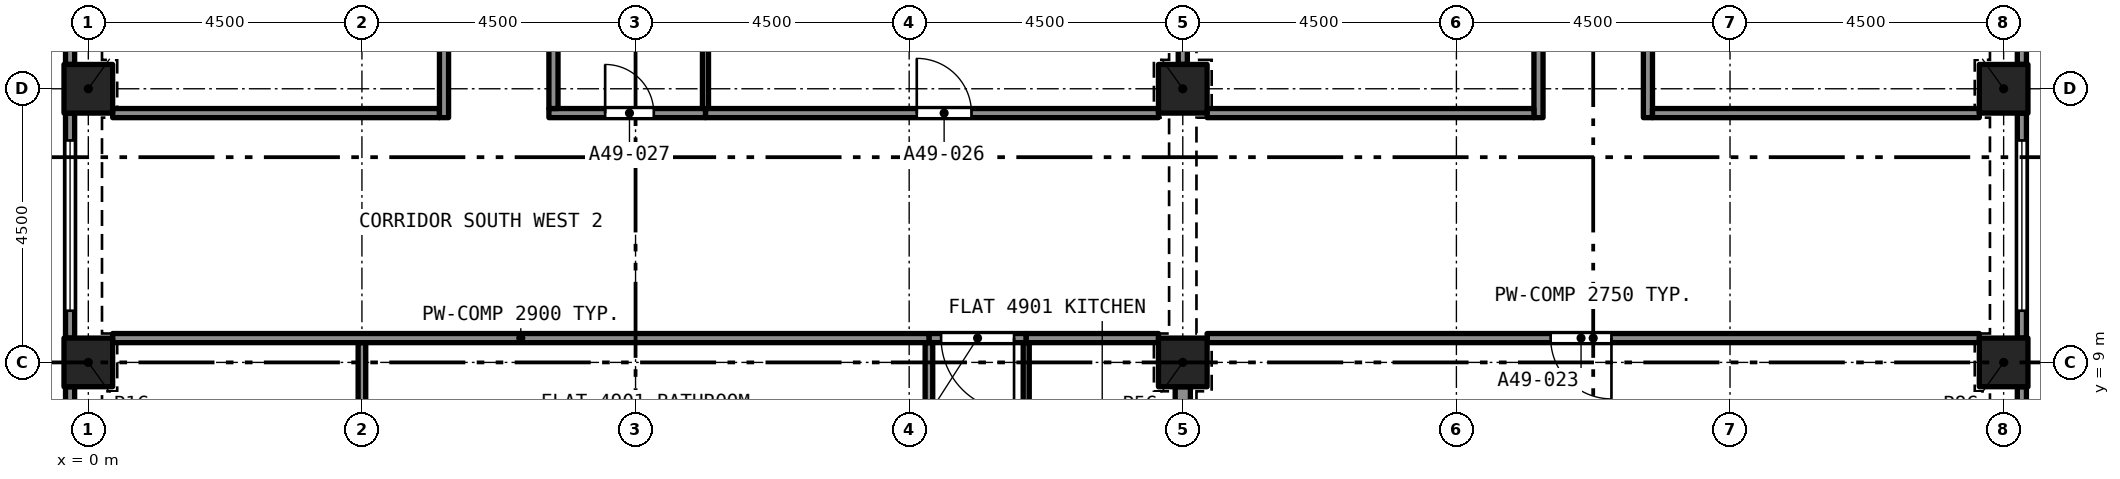
"""IFC4 building model, lengths in metres.
Left out: names, types, materials, properties, quantities, classifications, styles, units other than length and angle.
Written with IfcOpenShell. Run it as: python <this file> out.ifc"""

import sys

from ifc_helpers import new_model, si_unit, direction, frame, frame_2d, origin, origin_2d, place, context, subcontext, project, spatial, rectangle, extrude, element, fill, save


model = new_model("IFC4")
c1 = context("Model", 3, precision=1e-05, world=origin(), true_north=direction((0.0, 1.0)))
c2 = subcontext(c1, "Body", "Model", "MODEL_VIEW")
j1 = project(units=[si_unit("LENGTHUNIT", "METRE"), si_unit("PLANEANGLEUNIT", "RADIAN")], contexts=[c1])
p1 = place(None, origin())
s1 = spatial("IfcSite", under=j1, at=p1, CompositionType="ELEMENT")
p2 = place(p1, origin())
s2 = spatial("IfcBuilding", under=s1, at=p2, CompositionType="ELEMENT")
p3 = place(p2, frame((0.0, 0.0, 179.5)))
s3 = spatial("IfcBuildingStorey", under=s2, at=p3, CompositionType="ELEMENT", Elevation=179.5)
for number, where, z_axis, x_axis in (
    (1, (0.0, 9.0, 0.0), (0.0, 0.0, 1.0), (1.0, 0.0, 0.0)),
    (2, (18.0, 9.0, 0.0), (0.0, 0.0, 1.0), (1.0, 0.0, 0.0)),
    (3, (31.5, 9.0, 0.0), (0.0, 0.0, 1.0), (1.0, 0.0, 0.0)),
    (4, (0.0, 13.5, 0.0), (0.0, 0.0, 1.0), (1.0, 0.0, 0.0)),
    (5, (18.0, 13.5, 0.0), (0.0, 0.0, 1.0), (1.0, 0.0, 0.0)),
    (6, (31.5, 13.5, 0.0), (0.0, 0.0, 1.0), (1.0, 0.0, 0.0)),
):
    element("IfcColumn", number, at=place(p3, frame(where, z_axis=z_axis, x_axis=x_axis)), inside=s3, PredefinedType="COLUMN", context=c2, shape_type="SweptSolid", body=[
        extrude(rectangle(XDim=0.8, YDim=0.8, at=origin_2d()), origin(), (0.0, 0.0, 1.0), 3.2),
    ])
p4 = place(p3, frame((31.8, 8.6, 0.0), z_axis=(0.0, 0.0, 1.0), x_axis=(0.0, -1.0, 0.0)))
e7 = element("IfcWall", 7, at=p4, inside=s3, PredefinedType="SOLIDWALL", context=c2, shape_type="SweptSolid", body=[
    extrude(rectangle(XDim=3.7, YDim=0.15, at=frame_2d((1.85, 0.0))), origin(), (0.0, 0.0, 1.0), 3.2),
])
p5 = place(p4, frame((0.45, 0.0, 0.45)))
e8 = element("IfcOpeningElement", 8, at=p5, cuts=e7, PredefinedType="OPENING", context=c2, shape_type="SweptSolid", body=[
    extrude(rectangle(XDim=2.8, YDim=1.95, at=frame_2d((1.4, 0.975))), frame((0.0, 0.085, 0.0), z_axis=(0.0, -1.0, 0.0), x_axis=(1.0, 0.0, 0.0)), (0.0, 0.0, 1.0), 0.17),
])
p6 = place(p3, frame((31.8, 13.1, 0.0), z_axis=(0.0, 0.0, 1.0), x_axis=(0.0, -1.0, 0.0)))
e9 = element("IfcWall", 9, at=p6, inside=s3, PredefinedType="SOLIDWALL", context=c2, shape_type="SweptSolid", body=[
    extrude(rectangle(XDim=3.7, YDim=0.15, at=frame_2d((1.85, 0.0))), origin(), (0.0, 0.0, 1.0), 3.2),
])
p7 = place(p6, frame((0.45, 0.0, 0.45)))
e10 = element("IfcOpeningElement", 10, at=p7, cuts=e9, PredefinedType="OPENING", context=c2, shape_type="SweptSolid", body=[
    extrude(rectangle(XDim=2.8, YDim=1.95, at=frame_2d((1.4, 0.975))), frame((0.0, 0.085, 0.0), z_axis=(0.0, -1.0, 0.0), x_axis=(1.0, 0.0, 0.0)), (0.0, 0.0, 1.0), 0.17),
])
p8 = place(p3, frame((31.8, 17.6, 0.0), z_axis=(0.0, 0.0, 1.0), x_axis=(0.0, -1.0, 0.0)))
e11 = element("IfcWall", 11, at=p8, inside=s3, PredefinedType="SOLIDWALL", context=c2, shape_type="SweptSolid", body=[
    extrude(rectangle(XDim=3.7, YDim=0.15, at=frame_2d((1.85, 0.0))), origin(), (0.0, 0.0, 1.0), 3.2),
])
p9 = place(p8, frame((0.45, 0.0, 0.45)))
e12 = element("IfcOpeningElement", 12, at=p9, cuts=e11, PredefinedType="OPENING", context=c2, shape_type="SweptSolid", body=[
    extrude(rectangle(XDim=2.8, YDim=1.95, at=frame_2d((1.4, 0.975))), frame((0.0, 0.085, 0.0), z_axis=(0.0, -1.0, 0.0), x_axis=(1.0, 0.0, 0.0)), (0.0, 0.0, 1.0), 0.17),
])
p10 = place(p3, frame((-0.3, 13.9, 0.0), z_axis=(0.0, 0.0, 1.0), x_axis=(0.0, 1.0, 0.0)))
e13 = element("IfcWall", 13, at=p10, inside=s3, PredefinedType="SOLIDWALL", context=c2, shape_type="SweptSolid", body=[
    extrude(rectangle(XDim=3.7, YDim=0.15, at=frame_2d((1.85, 0.0))), origin(), (0.0, 0.0, 1.0), 3.2),
])
p11 = place(p10, frame((0.45, 0.0, 0.45)))
e14 = element("IfcOpeningElement", 14, at=p11, cuts=e13, PredefinedType="OPENING", context=c2, shape_type="SweptSolid", body=[
    extrude(rectangle(XDim=2.8, YDim=1.95, at=frame_2d((1.4, 0.975))), frame((0.0, 0.085, 0.0), z_axis=(0.0, -1.0, 0.0), x_axis=(1.0, 0.0, 0.0)), (0.0, 0.0, 1.0), 0.17),
])
p12 = place(p3, frame((-0.3, 9.4, 0.0), z_axis=(0.0, 0.0, 1.0), x_axis=(0.0, 1.0, 0.0)))
e15 = element("IfcWall", 15, at=p12, inside=s3, PredefinedType="SOLIDWALL", context=c2, shape_type="SweptSolid", body=[
    extrude(rectangle(XDim=3.7, YDim=0.15, at=frame_2d((1.85, 0.0))), origin(), (0.0, 0.0, 1.0), 3.2),
])
p13 = place(p12, frame((0.45, 0.0, 0.45)))
e16 = element("IfcOpeningElement", 16, at=p13, cuts=e15, PredefinedType="OPENING", context=c2, shape_type="SweptSolid", body=[
    extrude(rectangle(XDim=2.8, YDim=1.95, at=frame_2d((1.4, 0.975))), frame((0.0, 0.085, 0.0), z_axis=(0.0, -1.0, 0.0), x_axis=(1.0, 0.0, 0.0)), (0.0, 0.0, 1.0), 0.17),
])
p14 = place(p3, frame((-0.3, 4.9, 0.0), z_axis=(0.0, 0.0, 1.0), x_axis=(0.0, 1.0, 0.0)))
e17 = element("IfcWall", 17, at=p14, inside=s3, PredefinedType="SOLIDWALL", context=c2, shape_type="SweptSolid", body=[
    extrude(rectangle(XDim=3.7, YDim=0.15, at=frame_2d((1.85, 0.0))), origin(), (0.0, 0.0, 1.0), 3.2),
])
p15 = place(p14, frame((0.45, 0.0, 0.45)))
e18 = element("IfcOpeningElement", 18, at=p15, cuts=e17, PredefinedType="OPENING", context=c2, shape_type="SweptSolid", body=[
    extrude(rectangle(XDim=2.8, YDim=1.95, at=frame_2d((1.4, 0.975))), frame((0.0, 0.085, 0.0), z_axis=(0.0, -1.0, 0.0), x_axis=(1.0, 0.0, 0.0)), (0.0, 0.0, 1.0), 0.17),
])
p16 = place(p3, frame((13.825, 7.333, 0.0), z_axis=(0.0, 0.0, 1.0), x_axis=(0.0, 1.0, 0.0)))
e19 = element("IfcWall", 19, at=p16, inside=s3, PredefinedType="PARTITIONING", context=c2, shape_type="SweptSolid", body=[
    extrude(rectangle(XDim=1.992, YDim=0.125, at=frame_2d((0.996, 0.0))), origin(), (0.0, 0.0, 1.0), 2.9),
])
p17 = place(p3, frame((4.5, 7.27, 0.0), z_axis=(0.0, 0.0, 1.0), x_axis=(0.0, 1.0, 0.0)))
e20 = element("IfcWall", 20, at=p17, inside=s3, PredefinedType="PARTITIONING", context=c2, shape_type="SweptSolid", body=[
    extrude(rectangle(XDim=2.055, YDim=0.125, at=frame_2d((1.027, 0.0))), origin(), (0.0, 0.0, 1.0), 2.9),
])
p18 = place(p3, frame((18.0, 4.9, 0.0), z_axis=(0.0, 0.0, 1.0), x_axis=(0.0, 1.0, 0.0)))
e21 = element("IfcWall", 21, at=p18, inside=s3, PredefinedType="PARTITIONING", context=c2, shape_type="SweptSolid", body=[
    extrude(rectangle(XDim=3.7, YDim=0.25, at=frame_2d((1.85, 0.0))), origin(), (0.0, 0.0, 1.0), 2.38),
])
p19 = place(p3, frame((15.425, 7.32, 0.0), z_axis=(0.0, 0.0, 1.0), x_axis=(0.0, 1.0, 0.0)))
e22 = element("IfcWall", 22, at=p19, inside=s3, PredefinedType="PARTITIONING", context=c2, shape_type="SweptSolid", body=[
    extrude(rectangle(XDim=2.005, YDim=0.1, at=frame_2d((1.002, 0.0))), origin(), (0.0, 0.0, 1.0), 2.9),
])
p20 = place(p3, frame((15.425, 9.4, 0.0), z_axis=(0.0, 0.0, 1.0), x_axis=(-1.0, 0.0, 0.0)))
e23 = element("IfcWall", 23, at=p20, inside=s3, PredefinedType="PARTITIONING", context=c2, shape_type="SweptSolid", body=[
    extrude(rectangle(XDim=1.6, YDim=0.15, at=frame_2d((0.8, 0.0))), origin(), (0.0, 0.0, 1.0), 2.9),
])
p21 = place(p20, frame((0.2, 0.0, 0.0)))
e24 = element("IfcOpeningElement", 24, at=p21, cuts=e23, PredefinedType="OPENING", context=c2, shape_type="SweptSolid", body=[
    extrude(rectangle(XDim=1.2, YDim=2.4, at=frame_2d((0.6, 1.2))), frame((0.0, 0.085, 0.0), z_axis=(0.0, -1.0, 0.0), x_axis=(1.0, 0.0, 0.0)), (0.0, 0.0, 1.0), 0.17),
])
p22 = place(p3, frame((15.425, 9.4, 0.0), z_axis=(0.0, 0.0, 1.0), x_axis=(1.0, 0.0, 0.0)))
e25 = element("IfcWall", 25, at=p22, inside=s3, PredefinedType="PARTITIONING", context=c2, shape_type="SweptSolid", body=[
    extrude(rectangle(XDim=2.175, YDim=0.15, at=frame_2d((1.087, 0.0))), origin(), (0.0, 0.0, 1.0), 2.9),
])
p23 = place(p3, frame((0.4, 9.4, 0.0), z_axis=(0.0, 0.0, 1.0), x_axis=(1.0, 0.0, 0.0)))
e26 = element("IfcWall", 26, at=p23, inside=s3, PredefinedType="PARTITIONING", context=c2, shape_type="SweptSolid", body=[
    extrude(rectangle(XDim=13.425, YDim=0.15, at=frame_2d((6.712, 0.0))), origin(), (0.0, 0.0, 1.0), 2.9),
])
p24 = place(p3, frame((31.1, 9.4, 0.0), z_axis=(0.0, 0.0, 1.0), x_axis=(-1.0, 0.0, 0.0)))
e27 = element("IfcWall", 27, at=p24, inside=s3, PredefinedType="PARTITIONING", context=c2, shape_type="SweptSolid", body=[
    extrude(rectangle(XDim=12.7, YDim=0.15, at=frame_2d((6.35, 0.0))), origin(), (0.0, 0.0, 1.0), 2.75),
])
p25 = place(p24, frame((6.05, 0.0, 0.0)))
e28 = element("IfcOpeningElement", 28, at=p25, cuts=e27, PredefinedType="OPENING", context=c2, shape_type="SweptSolid", body=[
    extrude(rectangle(XDim=1.0, YDim=2.1, at=frame_2d((0.5, 1.05))), frame((0.0, 0.085, 0.0), z_axis=(0.0, -1.0, 0.0), x_axis=(1.0, 0.0, 0.0)), (0.0, 0.0, 1.0), 0.17),
])
p26 = place(p3, frame((23.85, 13.025, 0.0), z_axis=(0.0, 0.0, 1.0), x_axis=(0.0, 1.0, 0.0)))
e29 = element("IfcWall", 29, at=p26, inside=s3, PredefinedType="PARTITIONING", context=c2, shape_type="SweptSolid", body=[
    extrude(rectangle(XDim=9.55, YDim=0.15, at=frame_2d((4.775, 0.0))), origin(), (0.0, 0.0, 1.0), 2.75),
])
p27 = place(p26, frame((4.275, 0.0, 0.0)))
e30 = element("IfcOpeningElement", 30, at=p27, cuts=e29, PredefinedType="OPENING", context=c2, shape_type="SweptSolid", body=[
    extrude(rectangle(XDim=1.0, YDim=2.1, at=frame_2d((0.5, 1.05))), frame((0.0, 0.085, 0.0), z_axis=(0.0, -1.0, 0.0), x_axis=(1.0, 0.0, 0.0)), (0.0, 0.0, 1.0), 0.17),
])
p28 = place(p3, frame((25.65, 22.575, 0.0), z_axis=(0.0, 0.0, 1.0), x_axis=(0.0, -1.0, 0.0)))
e31 = element("IfcWall", 31, at=p28, inside=s3, PredefinedType="PARTITIONING", context=c2, shape_type="SweptSolid", body=[
    extrude(rectangle(XDim=9.55, YDim=0.15, at=frame_2d((4.775, 0.0))), origin(), (0.0, 0.0, 1.0), 2.75),
])
p29 = place(p28, frame((4.275, 0.0, 0.0)))
e32 = element("IfcOpeningElement", 32, at=p29, cuts=e31, PredefinedType="OPENING", context=c2, shape_type="SweptSolid", body=[
    extrude(rectangle(XDim=1.0, YDim=2.1, at=frame_2d((0.5, 1.05))), frame((0.0, 0.085, 0.0), z_axis=(0.0, -1.0, 0.0), x_axis=(1.0, 0.0, 0.0)), (0.0, 0.0, 1.0), 0.17),
])
for number, where, z_axis, x_axis in (
    (33, (18.4, 13.1, 0.0), (0.0, 0.0, 1.0), (1.0, 0.0, 0.0)),
    (34, (25.725, 13.1, 0.0), (0.0, 0.0, 1.0), (1.0, 0.0, 0.0)),
):
    element("IfcWall", number, at=place(p3, frame(where, z_axis=z_axis, x_axis=x_axis)), inside=s3, PredefinedType="PARTITIONING", context=c2, shape_type="SweptSolid", body=[
        extrude(rectangle(XDim=5.375, YDim=0.15, at=frame_2d((2.688, 0.0))), origin(), (0.0, 0.0, 1.0), 2.75),
    ])
p30 = place(p3, frame((10.15, 13.1, 0.0), z_axis=(0.0, 0.0, 1.0), x_axis=(1.0, 0.0, 0.0)))
e35 = element("IfcWall", 35, at=p30, inside=s3, PredefinedType="PARTITIONING", context=c2, shape_type="SweptSolid", body=[
    extrude(rectangle(XDim=7.45, YDim=0.15, at=frame_2d((3.725, 0.0))), origin(), (0.0, 0.0, 1.0), 2.9),
])
p31 = place(p30, frame((3.475, 0.0, 0.0)))
e36 = element("IfcOpeningElement", 36, at=p31, cuts=e35, PredefinedType="OPENING", context=c2, shape_type="SweptSolid", body=[
    extrude(rectangle(XDim=0.9, YDim=2.1, at=frame_2d((0.45, 1.05))), frame((0.0, 0.085, 0.0), z_axis=(0.0, -1.0, 0.0), x_axis=(1.0, 0.0, 0.0)), (0.0, 0.0, 1.0), 0.17),
])
p32 = place(p3, frame((7.575, 13.1, 0.0), z_axis=(0.0, 0.0, 1.0), x_axis=(1.0, 0.0, 0.0)))
e37 = element("IfcWall", 37, at=p32, inside=s3, PredefinedType="PARTITIONING", context=c2, shape_type="SweptSolid", body=[
    extrude(rectangle(XDim=2.575, YDim=0.15, at=frame_2d((1.288, 0.0))), origin(), (0.0, 0.0, 1.0), 2.9),
])
p33 = place(p32, frame((0.925, 0.0, 0.0)))
e38 = element("IfcOpeningElement", 38, at=p33, cuts=e37, PredefinedType="OPENING", context=c2, shape_type="SweptSolid", body=[
    extrude(rectangle(XDim=0.8, YDim=2.1, at=frame_2d((0.4, 1.05))), frame((0.0, 0.085, 0.0), z_axis=(0.0, -1.0, 0.0), x_axis=(1.0, 0.0, 0.0)), (0.0, 0.0, 1.0), 0.17),
])
p34 = place(p3, frame((0.4, 13.1, 0.0), z_axis=(0.0, 0.0, 1.0), x_axis=(1.0, 0.0, 0.0)))
e39 = element("IfcWall", 39, at=p34, inside=s3, PredefinedType="PARTITIONING", context=c2, shape_type="SweptSolid", body=[
    extrude(rectangle(XDim=5.375, YDim=0.15, at=frame_2d((2.688, 0.0))), origin(), (0.0, 0.0, 1.0), 2.9),
])
p35 = place(p3, frame((18.0, 13.9, 0.0), z_axis=(0.0, 0.0, 1.0), x_axis=(0.0, 1.0, 0.0)))
e40 = element("IfcWall", 40, at=p35, inside=s3, PredefinedType="PARTITIONING", context=c2, shape_type="SweptSolid", body=[
    extrude(rectangle(XDim=3.4, YDim=0.15, at=frame_2d((1.7, 0.0))), origin(), (0.0, 0.0, 1.0), 2.38),
])
p36 = place(p3, frame((7.65, 13.175, 0.0), z_axis=(0.0, 0.0, 1.0), x_axis=(0.0, 1.0, 0.0)))
e41 = element("IfcWall", 41, at=p36, inside=s3, PredefinedType="PARTITIONING", context=c2, shape_type="SweptSolid", body=[
    extrude(rectangle(XDim=4.125, YDim=0.15, at=frame_2d((2.062, 0.0))), origin(), (0.0, 0.0, 1.0), 2.9),
])
p37 = place(p3, frame((5.85, 13.025, 0.0), z_axis=(0.0, 0.0, 1.0), x_axis=(0.0, 1.0, 0.0)))
e42 = element("IfcWall", 42, at=p37, inside=s3, PredefinedType="PARTITIONING", context=c2, shape_type="SweptSolid", body=[
    extrude(rectangle(XDim=9.475, YDim=0.15, at=frame_2d((4.738, 0.0))), origin(), (0.0, 0.0, 1.0), 2.9),
])
p38 = place(p37, frame((4.275, 0.0, 0.0)))
e43 = element("IfcOpeningElement", 43, at=p38, cuts=e42, PredefinedType="OPENING", context=c2, shape_type="SweptSolid", body=[
    extrude(rectangle(XDim=1.0, YDim=2.1, at=frame_2d((0.5, 1.05))), frame((0.0, 0.085, 0.0), z_axis=(0.0, -1.0, 0.0), x_axis=(1.0, 0.0, 0.0)), (0.0, 0.0, 1.0), 0.17),
])
p39 = place(p3, frame((10.15, 13.175, 0.0), z_axis=(0.0, 0.0, 1.0), x_axis=(0.0, 1.0, 0.0)))
e44 = element("IfcWall", 44, at=p39, inside=s3, PredefinedType="PARTITIONING", context=c2, shape_type="SweptSolid", body=[
    extrude(rectangle(XDim=4.05, YDim=0.1, at=frame_2d((2.025, 0.0))), origin(), (0.0, 0.0, 1.0), 2.9),
])
p40 = place(p7, origin())
e45 = element("IfcWindow", 45, at=p40, inside=s3, PartitioningType="SINGLE_PANEL", PredefinedType="WINDOW", context=c2, shape_type="SweptSolid", body=[
    extrude(rectangle(XDim=2.8, YDim=1.95, at=frame_2d((1.4, 0.975))), frame((0.0, 0.03, 0.0), z_axis=(0.0, -1.0, 0.0), x_axis=(1.0, 0.0, 0.0)), (0.0, 0.0, 1.0), 0.06),
])
fill(e10, e45)
p41 = place(p13, origin())
e46 = element("IfcWindow", 46, at=p41, inside=s3, PartitioningType="SINGLE_PANEL", PredefinedType="WINDOW", context=c2, shape_type="SweptSolid", body=[
    extrude(rectangle(XDim=2.8, YDim=1.95, at=frame_2d((1.4, 0.975))), frame((0.0, 0.03, 0.0), z_axis=(0.0, -1.0, 0.0), x_axis=(1.0, 0.0, 0.0)), (0.0, 0.0, 1.0), 0.06),
])
fill(e16, e46)
p42 = place(p21, origin())
e47 = element("IfcDoor", 47, at=p42, inside=s3, OperationType="SINGLE_SWING_LEFT", PredefinedType="DOOR", context=c2, shape_type="SweptSolid", body=[
    extrude(rectangle(XDim=1.2, YDim=2.4, at=frame_2d((0.6, 1.2))), frame((0.0, 0.025, 0.0), z_axis=(0.0, -1.0, 0.0), x_axis=(1.0, 0.0, 0.0)), (0.0, 0.0, 1.0), 0.05),
])
fill(e24, e47)
p43 = place(p25, origin())
e48 = element("IfcDoor", 48, at=p43, inside=s3, OperationType="SINGLE_SWING_RIGHT", PredefinedType="DOOR", context=c2, shape_type="SweptSolid", body=[
    extrude(rectangle(XDim=1.0, YDim=2.1, at=frame_2d((0.5, 1.05))), frame((0.0, 0.025, 0.0), z_axis=(0.0, -1.0, 0.0), x_axis=(1.0, 0.0, 0.0)), (0.0, 0.0, 1.0), 0.05),
])
fill(e28, e48)
p44 = place(p31, origin())
e49 = element("IfcDoor", 49, at=p44, inside=s3, OperationType="SINGLE_SWING_RIGHT", PredefinedType="DOOR", context=c2, shape_type="SweptSolid", body=[
    extrude(rectangle(XDim=0.9, YDim=2.1, at=frame_2d((0.45, 1.05))), frame((0.0, 0.025, 0.0), z_axis=(0.0, -1.0, 0.0), x_axis=(1.0, 0.0, 0.0)), (0.0, 0.0, 1.0), 0.05),
])
fill(e36, e49)
p45 = place(p33, origin())
e50 = element("IfcDoor", 50, at=p45, inside=s3, OperationType="SINGLE_SWING_RIGHT", PredefinedType="DOOR", context=c2, shape_type="SweptSolid", body=[
    extrude(rectangle(XDim=0.8, YDim=2.1, at=frame_2d((0.4, 1.05))), frame((0.0, 0.025, 0.0), z_axis=(0.0, -1.0, 0.0), x_axis=(1.0, 0.0, 0.0)), (0.0, 0.0, 1.0), 0.05),
])
fill(e38, e50)
save(model, sys.argv[1])
